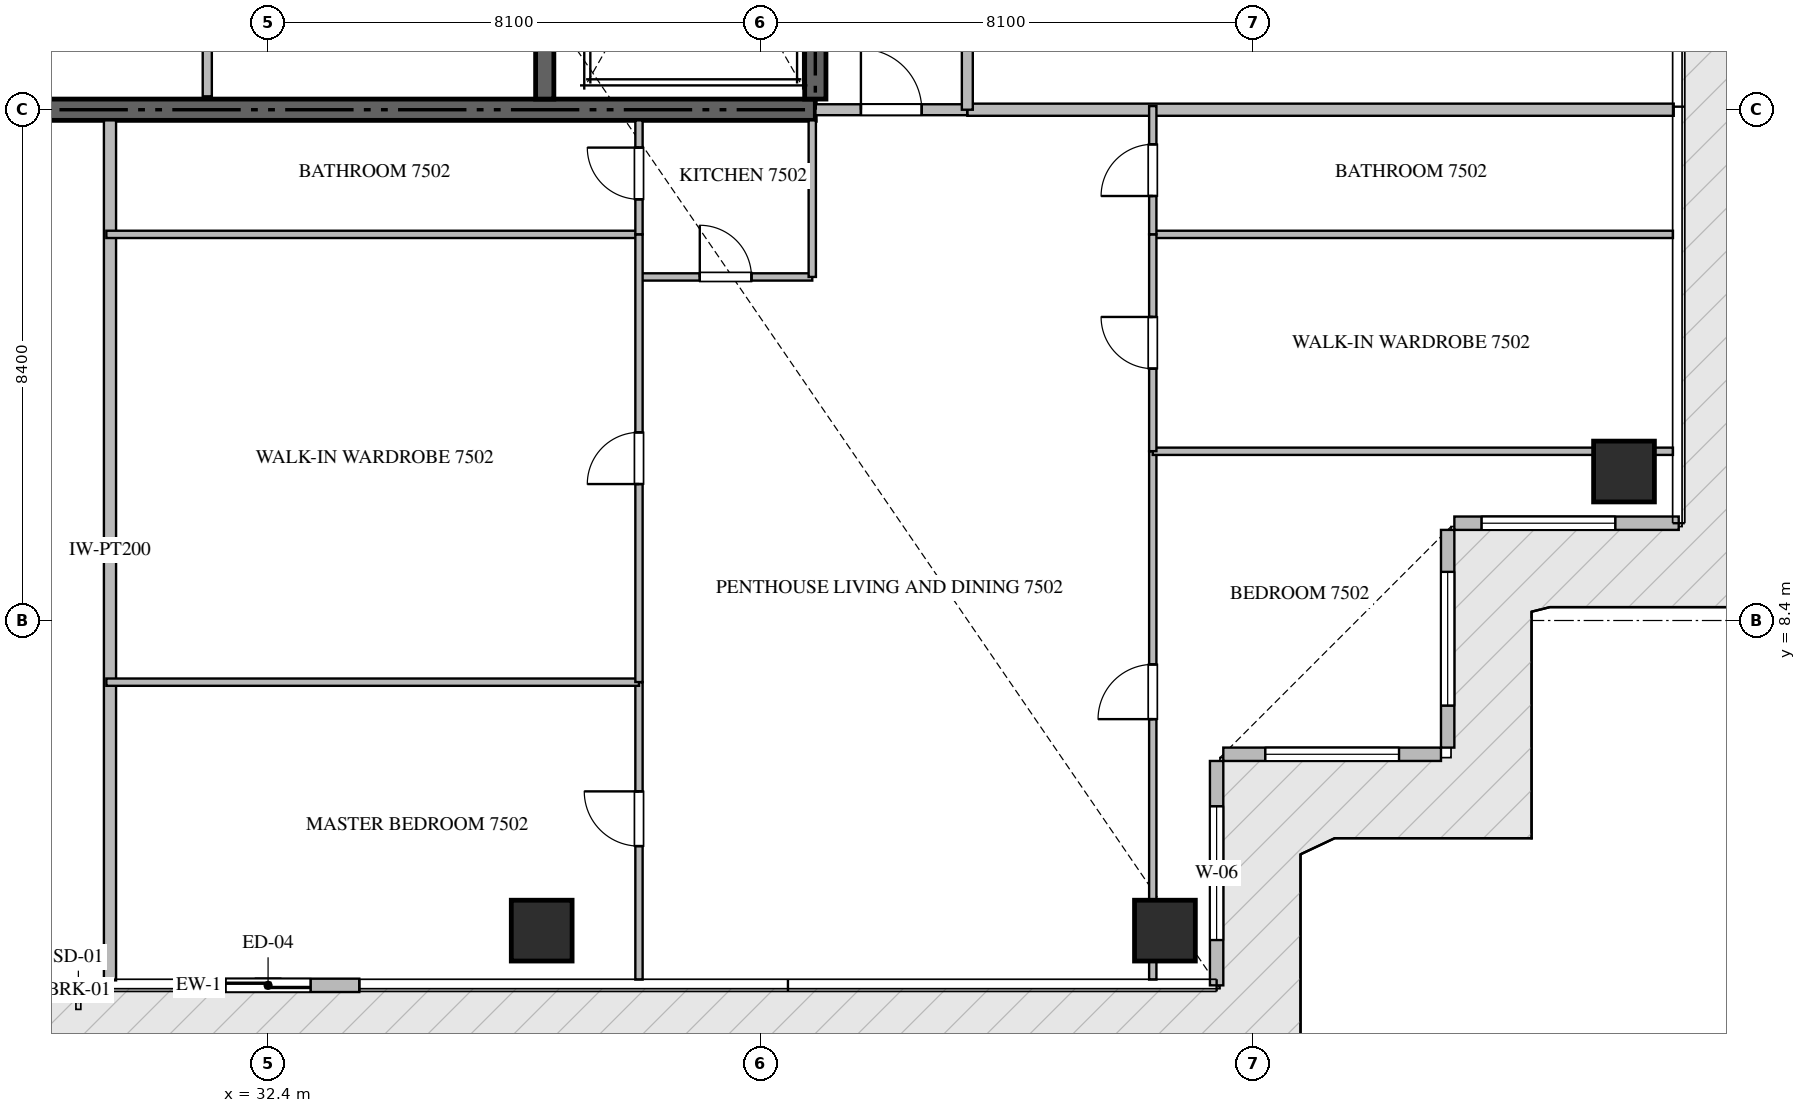
"""IFC4 building model, lengths in metres.
Left out: names, types, materials, properties, quantities, classifications, styles, units other than length and angle.
Written with IfcOpenShell. Run it as: python <this file> out.ifc"""

import sys

from ifc_helpers import new_model, si_unit, direction, frame, frame_2d, origin, origin_2d, place, context, subcontext, project, spatial, rectangle, extrude, source, transform, mapped, element, fill, save


model = new_model("IFC4")
c1 = context("Model", 3, precision=1e-05, world=origin(), true_north=direction((0.0, 1.0)))
c2 = subcontext(c1, "Body", "Model", "MODEL_VIEW")
j1 = project(units=[si_unit("LENGTHUNIT", "METRE"), si_unit("PLANEANGLEUNIT", "RADIAN")], contexts=[c1])
p1 = place(None, origin())
s1 = spatial("IfcSite", under=j1, at=p1, CompositionType="ELEMENT")
p2 = place(p1, origin())
s2 = spatial("IfcBuilding", under=s1, at=p2, CompositionType="ELEMENT")
p3 = place(p2, frame((0.0, 0.0, 301.55)))
s3 = spatial("IfcBuildingStorey", under=s2, at=p3, CompositionType="ELEMENT", Elevation=301.55)
p4 = place(p3, frame((23.4, 16.8, -0.26), z_axis=(0.0, 0.0, 1.0), x_axis=(1.0, 0.0, 0.0)))
e1 = element("IfcWall", 1, at=p4, inside=s3, PredefinedType="SHEAR", context=c2, shape_type="SweptSolid", body=[
    extrude(rectangle(XDim=18.0, YDim=0.35, at=frame_2d((9.0, 0.0))), origin(), (0.0, 0.0, 1.0), 4.048),
])
p5 = place(p3, frame((41.4, 16.975, -0.26), z_axis=(0.0, 0.0, 1.0), x_axis=(0.0, 1.0, 0.0)))
e2 = element("IfcWall", 2, at=p5, inside=s3, PredefinedType="SHEAR", context=c2, shape_type="SweptSolid", body=[
    extrude(rectangle(XDim=8.375, YDim=0.35, at=frame_2d((4.188, 0.0))), origin(), (0.0, 0.0, 1.0), 4.048),
])
p6 = place(p3, frame((36.95, 16.975, -0.26), z_axis=(0.0, 0.0, 1.0), x_axis=(0.0, 1.0, 0.0)))
e3 = element("IfcWall", 3, at=p6, inside=s3, PredefinedType="SHEAR", context=c2, shape_type="SweptSolid", body=[
    extrude(rectangle(XDim=8.375, YDim=0.3, at=frame_2d((4.188, 0.0))), origin(), (0.0, 0.0, 1.0), 4.048),
])
m1 = source(origin(), c2, "Body", "SweptSolid", [
    extrude(rectangle(XDim=1.0, YDim=1.0, at=origin_2d()), origin(), (0.0, 0.0, 1.0), 4.05),
])
for number, where, z_axis, x_axis in (
    (4, (36.9, 3.3, -0.26), (0.0, 0.0, 1.0), (1.0, 0.0, 0.0)),
    (5, (47.15, 3.3, -0.26), (0.0, 0.0, 1.0), (1.0, 0.0, 0.0)),
    (6, (54.7, 10.85, -0.26), (0.0, 0.0, 1.0), (1.0, 0.0, 0.0)),
):
    element("IfcColumn", number, at=place(p3, frame(where, z_axis=z_axis, x_axis=x_axis)), inside=s3, PredefinedType="COLUMN", context=c2, shape_type="MappedRepresentation", body=[
        mapped(m1, transform((0.0, 0.0, 0.0), scale=1.0)),
    ])
p7 = place(p3, frame((30.9, 2.4, 0.0), z_axis=(0.0, 0.0, 1.0), x_axis=(1.0, 0.0, 0.0)))
e7 = element("IfcWall", 7, at=p7, inside=s3, PredefinedType="ELEMENTEDWALL", context=c2, shape_type="SweptSolid", body=[
    extrude(rectangle(XDim=3.0, YDim=0.22, at=frame_2d((1.5, 0.0))), origin(), (0.0, 0.0, 1.0), 3.775),
])
p8 = place(p7, frame((0.8, 0.0, 0.0)))
e8 = element("IfcOpeningElement", 8, at=p8, cuts=e7, PredefinedType="OPENING", context=c2, shape_type="SweptSolid", body=[
    extrude(rectangle(XDim=1.4, YDim=2.25, at=frame_2d((0.7, 1.125))), frame((0.0, 0.12, 0.0), z_axis=(0.0, -1.0, 0.0), x_axis=(1.0, 0.0, 0.0)), (0.0, 0.0, 1.0), 0.24),
])
p9 = place(p3, frame((48.0, 2.4, 0.0), z_axis=(0.0, 0.0, 1.0), x_axis=(0.0, 1.0, 0.0)))
e9 = element("IfcWall", 9, at=p9, inside=s3, PredefinedType="ELEMENTEDWALL", context=c2, shape_type="SweptSolid", body=[
    extrude(rectangle(XDim=3.69, YDim=0.22, at=frame_2d((1.845, 0.0))), origin(), (0.0, 0.0, 1.0), 3.775),
])
p10 = place(p9, frame((0.745, 0.0, 0.65)))
e10 = element("IfcOpeningElement", 10, at=p10, cuts=e9, PredefinedType="OPENING", context=c2, shape_type="SweptSolid", body=[
    extrude(rectangle(XDim=2.2, YDim=2.4, at=frame_2d((1.1, 1.2))), frame((0.0, 0.12, 0.0), z_axis=(0.0, -1.0, 0.0), x_axis=(1.0, 0.0, 0.0)), (0.0, 0.0, 1.0), 0.24),
])
p11 = place(p3, frame((48.11, 6.2, 0.0), z_axis=(0.0, 0.0, 1.0), x_axis=(1.0, 0.0, 0.0)))
e11 = element("IfcWall", 11, at=p11, inside=s3, PredefinedType="ELEMENTEDWALL", context=c2, shape_type="SweptSolid", body=[
    extrude(rectangle(XDim=3.58, YDim=0.22, at=frame_2d((1.79, 0.0))), origin(), (0.0, 0.0, 1.0), 3.775),
])
p12 = place(p11, frame((0.69, 0.0, 0.65)))
e12 = element("IfcOpeningElement", 12, at=p12, cuts=e11, PredefinedType="OPENING", context=c2, shape_type="SweptSolid", body=[
    extrude(rectangle(XDim=2.2, YDim=2.4, at=frame_2d((1.1, 1.2))), frame((0.0, 0.12, 0.0), z_axis=(0.0, -1.0, 0.0), x_axis=(1.0, 0.0, 0.0)), (0.0, 0.0, 1.0), 0.24),
])
p13 = place(p3, frame((51.8, 6.31, 0.0), z_axis=(0.0, 0.0, 1.0), x_axis=(0.0, 1.0, 0.0)))
e13 = element("IfcWall", 13, at=p13, inside=s3, PredefinedType="ELEMENTEDWALL", context=c2, shape_type="SweptSolid", body=[
    extrude(rectangle(XDim=3.58, YDim=0.22, at=frame_2d((1.79, 0.0))), origin(), (0.0, 0.0, 1.0), 3.775),
])
p14 = place(p13, frame((0.69, 0.0, 0.65)))
e14 = element("IfcOpeningElement", 14, at=p14, cuts=e13, PredefinedType="OPENING", context=c2, shape_type="SweptSolid", body=[
    extrude(rectangle(XDim=2.2, YDim=2.4, at=frame_2d((1.1, 1.2))), frame((0.0, 0.12, 0.0), z_axis=(0.0, -1.0, 0.0), x_axis=(1.0, 0.0, 0.0)), (0.0, 0.0, 1.0), 0.24),
])
p15 = place(p3, frame((51.91, 10.0, 0.0), z_axis=(0.0, 0.0, 1.0), x_axis=(1.0, 0.0, 0.0)))
e15 = element("IfcWall", 15, at=p15, inside=s3, PredefinedType="ELEMENTEDWALL", context=c2, shape_type="SweptSolid", body=[
    extrude(rectangle(XDim=3.69, YDim=0.22, at=frame_2d((1.845, 0.0))), origin(), (0.0, 0.0, 1.0), 3.775),
])
p16 = place(p15, frame((0.447, 0.0, 0.65)))
e16 = element("IfcOpeningElement", 16, at=p16, cuts=e15, PredefinedType="OPENING", context=c2, shape_type="SweptSolid", body=[
    extrude(rectangle(XDim=2.2, YDim=2.4, at=frame_2d((1.1, 1.2))), frame((0.0, 0.12, 0.0), z_axis=(0.0, -1.0, 0.0), x_axis=(1.0, 0.0, 0.0)), (0.0, 0.0, 1.0), 0.24),
])
p17 = place(p3, frame((31.4, 17.02, 0.0), z_axis=(0.0, 0.0, 1.0), x_axis=(0.0, 1.0, 0.0)))
e17 = element("IfcWall", 17, at=p17, inside=s3, PredefinedType="PARTITIONING", context=c2, shape_type="SweptSolid", body=[
    extrude(rectangle(XDim=2.73, YDim=0.15, at=frame_2d((1.365, 0.0))), origin(), (0.0, 0.0, 1.0), 3.79),
])
p18 = place(p3, frame((29.8, 2.482, 0.0), z_axis=(0.0, 0.0, 1.0), x_axis=(0.0, 1.0, 0.0)))
e18 = element("IfcWall", 18, at=p18, inside=s3, PredefinedType="PARTITIONING", context=c2, shape_type="SweptSolid", body=[
    extrude(rectangle(XDim=14.143, YDim=0.2, at=frame_2d((7.072, 0.0))), origin(), (0.0, 0.0, 1.0), 3.79),
])
p19 = place(p3, frame((43.9, 16.8, 0.0), z_axis=(0.0, 0.0, 1.0), x_axis=(1.0, 0.0, 0.0)))
e19 = element("IfcWall", 19, at=p19, inside=s3, PredefinedType="PARTITIONING", context=c2, shape_type="SweptSolid", body=[
    extrude(rectangle(XDim=11.618, YDim=0.2, at=frame_2d((5.809, 0.0))), origin(), (0.0, 0.0, 1.0), 3.79),
])
p20 = place(p3, frame((41.402, 16.8, 0.0), z_axis=(0.0, 0.0, 1.0), x_axis=(1.0, 0.0, 0.0)))
e20 = element("IfcWall", 20, at=p20, inside=s3, PredefinedType="PARTITIONING", context=c2, shape_type="SweptSolid", body=[
    extrude(rectangle(XDim=2.496, YDim=0.18, at=frame_2d((1.248, 0.0))), origin(), (0.0, 0.0, 1.0), 3.79),
])
p21 = place(p20, frame((0.748, 0.0, 0.0)))
e21 = element("IfcOpeningElement", 21, at=p21, cuts=e20, PredefinedType="OPENING", context=c2, shape_type="SweptSolid", body=[
    extrude(rectangle(XDim=1.0, YDim=2.15, at=frame_2d((0.5, 1.075))), frame((0.0, 0.1, 0.0), z_axis=(0.0, -1.0, 0.0), x_axis=(1.0, 0.0, 0.0)), (0.0, 0.0, 1.0), 0.2),
])
p22 = place(p3, frame((43.9, 16.8, 0.0), z_axis=(0.0, 0.0, 1.0), x_axis=(0.0, 1.0, 0.0)))
e22 = element("IfcWall", 22, at=p22, inside=s3, PredefinedType="PARTITIONING", context=c2, shape_type="SweptSolid", body=[
    extrude(rectangle(XDim=16.8, YDim=0.18, at=frame_2d((8.4, 0.0))), origin(), (0.0, 0.0, 1.0), 3.79),
])
p23 = place(p22, frame((1.3, 0.0, 0.0)))
e23 = element("IfcOpeningElement", 23, at=p23, cuts=e22, PredefinedType="OPENING", context=c2, shape_type="SweptSolid", body=[
    extrude(rectangle(XDim=1.0, YDim=2.15, at=frame_2d((0.5, 1.075))), frame((0.0, 0.1, 0.0), z_axis=(0.0, -1.0, 0.0), x_axis=(1.0, 0.0, 0.0)), (0.0, 0.0, 1.0), 0.2),
])
p24 = place(p3, frame((38.5, 14.05, 0.0), z_axis=(0.0, 0.0, 1.0), x_axis=(1.0, 0.0, 0.0)))
e24 = element("IfcWall", 24, at=p24, inside=s3, PredefinedType="PARTITIONING", context=c2, shape_type="SweptSolid", body=[
    extrude(rectangle(XDim=2.85, YDim=0.12, at=frame_2d((1.425, 0.0))), origin(), (0.0, 0.0, 1.0), 3.79),
])
p25 = place(p24, frame((1.0, 0.0, 0.0)))
e25 = element("IfcOpeningElement", 25, at=p25, cuts=e24, PredefinedType="OPENING", context=c2, shape_type="SweptSolid", body=[
    extrude(rectangle(XDim=0.85, YDim=2.1, at=frame_2d((0.425, 1.05))), frame((0.0, 0.07, 0.0), z_axis=(0.0, -1.0, 0.0), x_axis=(1.0, 0.0, 0.0)), (0.0, 0.0, 1.0), 0.14),
])
p26 = place(p3, frame((41.35, 14.05, 0.0), z_axis=(0.0, 0.0, 1.0), x_axis=(0.0, 1.0, 0.0)))
e26 = element("IfcWall", 26, at=p26, inside=s3, PredefinedType="PARTITIONING", context=c2, shape_type="SweptSolid", body=[
    extrude(rectangle(XDim=2.575, YDim=0.12, at=frame_2d((1.288, 0.0))), origin(), (0.0, 0.0, 1.0), 3.79),
])
p27 = place(p3, frame((38.5, 2.495, 0.0), z_axis=(0.0, 0.0, 1.0), x_axis=(0.0, 1.0, 0.0)))
e27 = element("IfcWall", 27, at=p27, inside=s3, PredefinedType="PARTITIONING", context=c2, shape_type="SweptSolid", body=[
    extrude(rectangle(XDim=4.891, YDim=0.12, at=frame_2d((2.445, 0.0))), origin(), (0.0, 0.0, 1.0), 3.79),
])
p28 = place(p27, frame((2.195, 0.0, 0.0)))
e28 = element("IfcOpeningElement", 28, at=p28, cuts=e27, PredefinedType="OPENING", context=c2, shape_type="SweptSolid", body=[
    extrude(rectangle(XDim=0.9, YDim=2.1, at=frame_2d((0.45, 1.05))), frame((0.0, 0.07, 0.0), z_axis=(0.0, -1.0, 0.0), x_axis=(1.0, 0.0, 0.0)), (0.0, 0.0, 1.0), 0.14),
])
for number, where, z_axis, x_axis in (
    (29, (29.74, 7.386, 0.0), (0.0, 0.0, 1.0), (1.0, 0.0, 0.0)),
    (30, (29.74, 14.75, 0.0), (0.0, 0.0, 1.0), (1.0, 0.0, 0.0)),
):
    element("IfcWall", number, at=place(p3, frame(where, z_axis=z_axis, x_axis=x_axis)), inside=s3, PredefinedType="PARTITIONING", context=c2, shape_type="SweptSolid", body=[
        extrude(rectangle(XDim=8.76, YDim=0.12, at=frame_2d((4.38, 0.0))), origin(), (0.0, 0.0, 1.0), 3.79),
    ])
p29 = place(p3, frame((38.5, 7.388, 0.0), z_axis=(0.0, 0.0, 1.0), x_axis=(0.0, 1.0, 0.0)))
e31 = element("IfcWall", 31, at=p29, inside=s3, PredefinedType="PARTITIONING", context=c2, shape_type="SweptSolid", body=[
    extrude(rectangle(XDim=7.362, YDim=0.12, at=frame_2d((3.681, 0.0))), origin(), (0.0, 0.0, 1.0), 3.79),
])
p30 = place(p29, frame((3.256, 0.0, 0.0)))
e32 = element("IfcOpeningElement", 32, at=p30, cuts=e31, PredefinedType="OPENING", context=c2, shape_type="SweptSolid", body=[
    extrude(rectangle(XDim=0.85, YDim=2.1, at=frame_2d((0.425, 1.05))), frame((0.0, 0.07, 0.0), z_axis=(0.0, -1.0, 0.0), x_axis=(1.0, 0.0, 0.0)), (0.0, 0.0, 1.0), 0.14),
])
p31 = place(p3, frame((38.5, 14.752, 0.0), z_axis=(0.0, 0.0, 1.0), x_axis=(0.0, 1.0, 0.0)))
e33 = element("IfcWall", 33, at=p31, inside=s3, PredefinedType="PARTITIONING", context=c2, shape_type="SweptSolid", body=[
    extrude(rectangle(XDim=1.873, YDim=0.12, at=frame_2d((0.937, 0.0))), origin(), (0.0, 0.0, 1.0), 3.79),
])
p32 = place(p31, frame((0.575, 0.0, 0.0)))
e34 = element("IfcOpeningElement", 34, at=p32, cuts=e33, PredefinedType="OPENING", context=c2, shape_type="SweptSolid", body=[
    extrude(rectangle(XDim=0.85, YDim=2.1, at=frame_2d((0.425, 1.05))), frame((0.0, 0.07, 0.0), z_axis=(0.0, -1.0, 0.0), x_axis=(1.0, 0.0, 0.0)), (0.0, 0.0, 1.0), 0.14),
])
p33 = place(p3, frame((46.95, 2.495, 0.0), z_axis=(0.0, 0.0, 1.0), x_axis=(0.0, 1.0, 0.0)))
e35 = element("IfcWall", 35, at=p33, inside=s3, PredefinedType="PARTITIONING", context=c2, shape_type="SweptSolid", body=[
    extrude(rectangle(XDim=8.688, YDim=0.12, at=frame_2d((4.344, 0.0))), origin(), (0.0, 0.0, 1.0), 3.292),
])
p34 = place(p33, frame((4.283, 0.0, 0.0)))
e36 = element("IfcOpeningElement", 36, at=p34, cuts=e35, PredefinedType="OPENING", context=c2, shape_type="SweptSolid", body=[
    extrude(rectangle(XDim=0.9, YDim=2.1, at=frame_2d((0.45, 1.05))), frame((0.0, 0.07, 0.0), z_axis=(0.0, -1.0, 0.0), x_axis=(1.0, 0.0, 0.0)), (0.0, 0.0, 1.0), 0.14),
])
for number, where, z_axis, x_axis in (
    (37, (46.95, 11.183, 0.0), (0.0, 0.0, 1.0), (1.0, 0.0, 0.0)),
    (38, (46.95, 14.75, 0.0), (0.0, 0.0, 1.0), (1.0, 0.0, 0.0)),
):
    element("IfcWall", number, at=place(p3, frame(where, z_axis=z_axis, x_axis=x_axis)), inside=s3, PredefinedType="PARTITIONING", context=c2, shape_type="SweptSolid", body=[
        extrude(rectangle(XDim=8.555, YDim=0.12, at=frame_2d((4.277, 0.0))), origin(), (0.0, 0.0, 1.0), 3.79),
    ])
p35 = place(p3, frame((46.95, 11.185, 0.0), z_axis=(0.0, 0.0, 1.0), x_axis=(0.0, 1.0, 0.0)))
e39 = element("IfcWall", 39, at=p35, inside=s3, PredefinedType="PARTITIONING", context=c2, shape_type="SweptSolid", body=[
    extrude(rectangle(XDim=3.565, YDim=0.12, at=frame_2d((1.782, 0.0))), origin(), (0.0, 0.0, 1.0), 3.372),
])
p36 = place(p35, frame((1.357, 0.0, 0.0)))
e40 = element("IfcOpeningElement", 40, at=p36, cuts=e39, PredefinedType="OPENING", context=c2, shape_type="SweptSolid", body=[
    extrude(rectangle(XDim=0.85, YDim=2.1, at=frame_2d((0.425, 1.05))), frame((0.0, 0.07, 0.0), z_axis=(0.0, -1.0, 0.0), x_axis=(1.0, 0.0, 0.0)), (0.0, 0.0, 1.0), 0.14),
])
p37 = place(p3, frame((46.95, 14.752, 0.0), z_axis=(0.0, 0.0, 1.0), x_axis=(0.0, 1.0, 0.0)))
e41 = element("IfcWall", 41, at=p37, inside=s3, PredefinedType="PARTITIONING", context=c2, shape_type="SweptSolid", body=[
    extrude(rectangle(XDim=2.108, YDim=0.12, at=frame_2d((1.054, 0.0))), origin(), (0.0, 0.0, 1.0), 3.372),
])
p38 = place(p37, frame((0.629, 0.0, 0.0)))
e42 = element("IfcOpeningElement", 42, at=p38, cuts=e41, PredefinedType="OPENING", context=c2, shape_type="SweptSolid", body=[
    extrude(rectangle(XDim=0.85, YDim=2.1, at=frame_2d((0.425, 1.05))), frame((0.0, 0.07, 0.0), z_axis=(0.0, -1.0, 0.0), x_axis=(1.0, 0.0, 0.0)), (0.0, 0.0, 1.0), 0.14),
])
m2 = source(origin(), c2, "Body", "SweptSolid", [
    extrude(rectangle(XDim=1.4, YDim=2.25, at=frame_2d((0.7, 1.125))), frame((0.0, 0.025, 0.0), z_axis=(0.0, -1.0, 0.0), x_axis=(1.0, 0.0, 0.0)), (0.0, 0.0, 1.0), 0.05),
])
p39 = place(p8, origin())
e43 = element("IfcDoor", 43, at=p39, inside=s3, OperationType="SLIDING_TO_LEFT", PredefinedType="DOOR", context=c2, shape_type="MappedRepresentation", body=[
    mapped(m2, transform((0.0, 0.0, 0.0), scale=1.0)),
])
fill(e8, e43)
m3 = source(origin(), c2, "Body", "SweptSolid", [
    extrude(rectangle(XDim=2.2, YDim=2.4, at=frame_2d((1.1, 1.2))), frame((0.0, 0.03, 0.0), z_axis=(0.0, -1.0, 0.0), x_axis=(1.0, 0.0, 0.0)), (0.0, 0.0, 1.0), 0.06),
])
p40 = place(p10, origin())
e44 = element("IfcWindow", 44, at=p40, inside=s3, PartitioningType="SINGLE_PANEL", PredefinedType="WINDOW", context=c2, shape_type="MappedRepresentation", body=[
    mapped(m3, transform((0.0, 0.0, 0.0), scale=1.0)),
])
fill(e10, e44)
p41 = place(p12, origin())
e45 = element("IfcWindow", 45, at=p41, inside=s3, PartitioningType="SINGLE_PANEL", PredefinedType="WINDOW", context=c2, shape_type="MappedRepresentation", body=[
    mapped(m3, transform((0.0, 0.0, 0.0), scale=1.0)),
])
fill(e12, e45)
p42 = place(p14, origin())
e46 = element("IfcWindow", 46, at=p42, inside=s3, PartitioningType="SINGLE_PANEL", PredefinedType="WINDOW", context=c2, shape_type="MappedRepresentation", body=[
    mapped(m3, transform((0.0, 0.0, 0.0), scale=1.0)),
])
fill(e14, e46)
p43 = place(p16, origin())
e47 = element("IfcWindow", 47, at=p43, inside=s3, PartitioningType="SINGLE_PANEL", PredefinedType="WINDOW", context=c2, shape_type="MappedRepresentation", body=[
    mapped(m3, transform((0.0, 0.0, 0.0), scale=1.0)),
])
fill(e16, e47)
m4 = source(origin(), c2, "Body", "SweptSolid", [
    extrude(rectangle(XDim=1.0, YDim=2.15, at=frame_2d((0.5, 1.075))), frame((0.0, 0.025, 0.0), z_axis=(0.0, -1.0, 0.0), x_axis=(1.0, 0.0, 0.0)), (0.0, 0.0, 1.0), 0.05),
])
p44 = place(p21, origin())
e48 = element("IfcDoor", 48, at=p44, inside=s3, OperationType="SINGLE_SWING_LEFT", PredefinedType="DOOR", context=c2, shape_type="MappedRepresentation", body=[
    mapped(m4, transform((0.0, 0.0, 0.0), scale=1.0)),
])
fill(e21, e48)
m5 = source(origin(), c2, "Body", "SweptSolid", [
    extrude(rectangle(XDim=0.85, YDim=2.1, at=frame_2d((0.425, 1.05))), frame((0.0, 0.025, 0.0), z_axis=(0.0, -1.0, 0.0), x_axis=(1.0, 0.0, 0.0)), (0.0, 0.0, 1.0), 0.05),
])
p45 = place(p25, origin())
e49 = element("IfcDoor", 49, at=p45, inside=s3, OperationType="SINGLE_SWING_LEFT", PredefinedType="DOOR", context=c2, shape_type="MappedRepresentation", body=[
    mapped(m5, transform((0.0, 0.0, 0.0), scale=1.0)),
])
fill(e25, e49)
m6 = source(origin(), c2, "Body", "SweptSolid", [
    extrude(rectangle(XDim=0.9, YDim=2.1, at=frame_2d((0.45, 1.05))), frame((0.0, 0.025, 0.0), z_axis=(0.0, -1.0, 0.0), x_axis=(1.0, 0.0, 0.0)), (0.0, 0.0, 1.0), 0.05),
])
p46 = place(p28, origin())
e50 = element("IfcDoor", 50, at=p46, inside=s3, OperationType="SINGLE_SWING_RIGHT", PredefinedType="DOOR", context=c2, shape_type="MappedRepresentation", body=[
    mapped(m6, transform((0.0, 0.0, 0.0), scale=1.0)),
])
fill(e28, e50)
p47 = place(p30, origin())
e51 = element("IfcDoor", 51, at=p47, inside=s3, OperationType="SINGLE_SWING_LEFT", PredefinedType="DOOR", context=c2, shape_type="MappedRepresentation", body=[
    mapped(m5, transform((0.0, 0.0, 0.0), scale=1.0)),
])
fill(e32, e51)
p48 = place(p32, origin())
e52 = element("IfcDoor", 52, at=p48, inside=s3, OperationType="SINGLE_SWING_RIGHT", PredefinedType="DOOR", context=c2, shape_type="MappedRepresentation", body=[
    mapped(m5, transform((0.0, 0.0, 0.0), scale=1.0)),
])
fill(e34, e52)
p49 = place(p34, origin())
e53 = element("IfcDoor", 53, at=p49, inside=s3, OperationType="SINGLE_SWING_LEFT", PredefinedType="DOOR", context=c2, shape_type="MappedRepresentation", body=[
    mapped(m6, transform((0.0, 0.0, 0.0), scale=1.0)),
])
fill(e36, e53)
p50 = place(p36, origin())
e54 = element("IfcDoor", 54, at=p50, inside=s3, OperationType="SINGLE_SWING_RIGHT", PredefinedType="DOOR", context=c2, shape_type="MappedRepresentation", body=[
    mapped(m5, transform((0.0, 0.0, 0.0), scale=1.0)),
])
fill(e40, e54)
p51 = place(p38, origin())
e55 = element("IfcDoor", 55, at=p51, inside=s3, OperationType="SINGLE_SWING_LEFT", PredefinedType="DOOR", context=c2, shape_type="MappedRepresentation", body=[
    mapped(m5, transform((0.0, 0.0, 0.0), scale=1.0)),
])
fill(e42, e55)
save(model, sys.argv[1])
